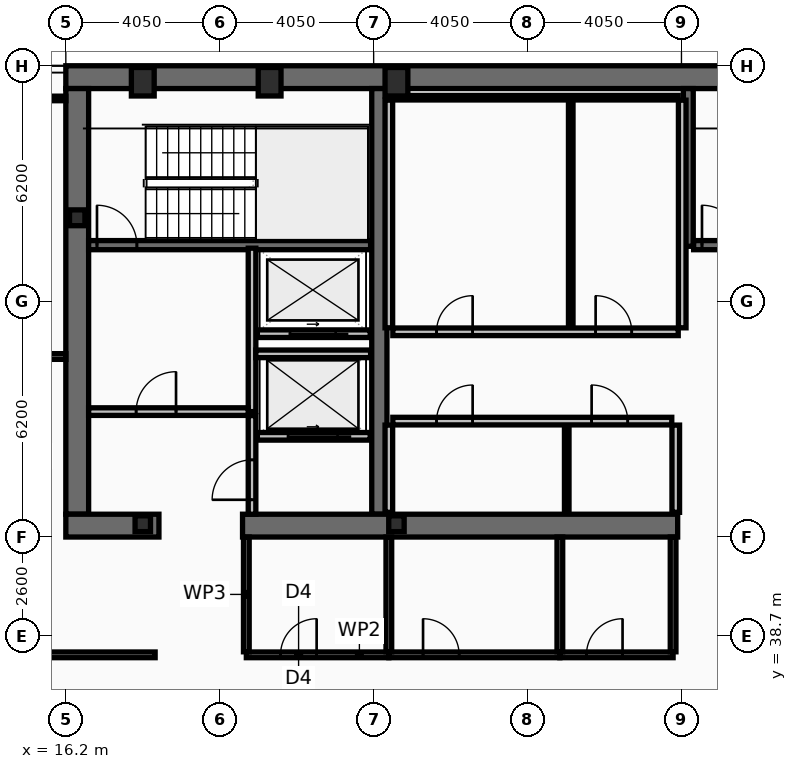
"""IFC4 building model, lengths in metres.
Left out: names, types, materials, properties, quantities, classifications, styles, units other than length and angle.
Written with IfcOpenShell. Run it as: python <this file> out.ifc"""

import sys

from ifc_helpers import new_model, si_unit, direction, frame, frame_2d, origin, origin_2d, place, context, subcontext, project, spatial, rectangle, hollow_rectangle, i_section, extrude, element, fill, save


model = new_model("IFC4")
c1 = context("Model", 3, precision=1e-05, world=origin(), true_north=direction((0.0, 1.0)))
c2 = subcontext(c1, "Body", "Model", "MODEL_VIEW")
j1 = project(units=[si_unit("LENGTHUNIT", "METRE"), si_unit("PLANEANGLEUNIT", "RADIAN")], contexts=[c1])
p1 = place(None, origin())
s1 = spatial("IfcSite", under=j1, at=p1, CompositionType="ELEMENT")
p2 = place(p1, origin())
s2 = spatial("IfcBuilding", under=s1, at=p2, CompositionType="ELEMENT")
p3 = place(p2, frame((0.0, 0.0, 261.8)))
s3 = spatial("IfcBuildingStorey", under=s2, at=p3, CompositionType="ELEMENT", Elevation=261.8)
p4 = place(p3, frame((16.2, 53.4, 0.0), z_axis=(0.0, 0.0, 1.0), x_axis=(1.0, 0.0, 0.0)))
e1 = element("IfcWall", 1, at=p4, inside=s3, PredefinedType="SHEAR", context=c2, shape_type="SweptSolid", body=[
    extrude(rectangle(XDim=40.5, YDim=0.6, at=frame_2d((20.25, 0.0))), origin(), (0.0, 0.0, 1.0), 3.4),
])
p5 = place(p3, frame((16.5, 41.9, 0.0), z_axis=(0.0, 0.0, 1.0), x_axis=(0.0, 1.0, 0.0)))
e2 = element("IfcWall", 2, at=p5, inside=s3, PredefinedType="SHEAR", context=c2, shape_type="SweptSolid", body=[
    extrude(rectangle(XDim=11.2, YDim=0.6, at=frame_2d((5.6, 0.0))), origin(), (0.0, 0.0, 1.0), 3.4),
])
p6 = place(p3, frame((24.45, 41.9, 0.0), z_axis=(0.0, 0.0, 1.0), x_axis=(0.0, 1.0, 0.0)))
e3 = element("IfcWall", 3, at=p6, inside=s3, PredefinedType="SHEAR", context=c2, shape_type="SweptSolid", body=[
    extrude(rectangle(XDim=11.2, YDim=0.4, at=frame_2d((5.6, 0.0))), origin(), (0.0, 0.0, 1.0), 3.4),
])
p7 = place(p3, frame((18.65, 41.6, 0.0), z_axis=(0.0, 0.0, 1.0), x_axis=(-1.0, 0.0, 0.0)))
e4 = element("IfcWall", 4, at=p7, inside=s3, PredefinedType="SHEAR", context=c2, shape_type="SweptSolid", body=[
    extrude(rectangle(XDim=2.45, YDim=0.6, at=frame_2d((1.225, 0.0))), origin(), (0.0, 0.0, 1.0), 3.4),
])
p8 = place(p3, frame((32.3, 41.6, 0.0), z_axis=(0.0, 0.0, 1.0), x_axis=(-1.0, 0.0, 0.0)))
e5 = element("IfcWall", 5, at=p8, inside=s3, PredefinedType="SHEAR", context=c2, shape_type="SweptSolid", body=[
    extrude(rectangle(XDim=11.45, YDim=0.6, at=frame_2d((5.725, 0.0))), origin(), (0.0, 0.0, 1.0), 3.4),
])
p9 = place(p3, frame((32.58, 48.95, 0.0), z_axis=(0.0, 0.0, 1.0), x_axis=(0.0, 1.0, 0.0)))
e6 = element("IfcWall", 6, at=p9, inside=s3, PredefinedType="SHEAR", context=c2, shape_type="SweptSolid", body=[
    extrude(rectangle(XDim=4.15, YDim=0.26, at=frame_2d((2.075, 0.0))), origin(), (0.0, 0.0, 1.0), 3.4),
])
p10 = place(p3, frame((16.8, 48.98, 0.0), z_axis=(0.0, 0.0, 1.0), x_axis=(1.0, 0.0, 0.0)))
e7 = element("IfcWall", 7, at=p10, inside=s3, PredefinedType="SHEAR", context=c2, shape_type="SweptSolid", body=[
    extrude(rectangle(XDim=7.42, YDim=0.24, at=frame_2d((3.71, 0.0))), origin(), (0.0, 0.0, 1.0), 3.4),
])
p11 = place(p10, frame((0.22, 0.0, 0.0)))
e8 = element("IfcOpeningElement", 8, at=p11, cuts=e7, PredefinedType="OPENING", context=c2, shape_type="SweptSolid", body=[
    extrude(rectangle(XDim=1.05, YDim=2.15, at=frame_2d((0.525, 1.075))), frame((0.0, 0.13, 0.0), z_axis=(0.0, -1.0, 0.0), x_axis=(1.0, 0.0, 0.0)), (0.0, 0.0, 1.0), 0.26),
])
p12 = place(p3, frame((32.72, 48.98, 0.0), z_axis=(0.0, 0.0, 1.0), x_axis=(1.0, 0.0, 0.0)))
e9 = element("IfcWall", 9, at=p12, inside=s3, PredefinedType="SHEAR", context=c2, shape_type="SweptSolid", body=[
    extrude(rectangle(XDim=7.56, YDim=0.24, at=frame_2d((3.78, 0.0))), origin(), (0.0, 0.0, 1.0), 3.4),
])
p13 = place(p12, frame((0.22, 0.0, 0.0)))
e10 = element("IfcOpeningElement", 10, at=p13, cuts=e9, PredefinedType="OPENING", context=c2, shape_type="SweptSolid", body=[
    extrude(rectangle(XDim=1.05, YDim=2.15, at=frame_2d((0.525, 1.075))), frame((0.0, 0.13, 0.0), z_axis=(0.0, -1.0, 0.0), x_axis=(1.0, 0.0, 0.0)), (0.0, 0.0, 1.0), 0.26),
])
for number, where, z_axis, x_axis in (
    (11, (18.225, 53.28, 0.0), (0.0, 0.0, 1.0), (1.0, 0.0, 0.0)),
    (12, (21.562, 53.28, 0.0), (0.0, 0.0, 1.0), (1.0, 0.0, 0.0)),
    (13, (24.9, 53.28, 0.0), (0.0, 0.0, 1.0), (1.0, 0.0, 0.0)),
):
    element("IfcColumn", number, at=place(p3, frame(where, z_axis=z_axis, x_axis=x_axis)), inside=s3, PredefinedType="COLUMN", context=c2, shape_type="SweptSolid", body=[
        extrude(hollow_rectangle(XDim=0.6, YDim=0.75, WallThickness=0.045, at=origin_2d()), origin(), (0.0, 0.0, 1.0), 3.6),
    ])
for number, where, z_axis, x_axis in (
    (14, (16.5, 49.7, 0.0), (0.0, 0.0, 1.0), (1.0, 0.0, 0.0)),
    (15, (18.225, 41.65, 0.0), (0.0, 0.0, 1.0), (1.0, 0.0, 0.0)),
    (16, (24.9, 41.65, 0.0), (0.0, 0.0, 1.0), (1.0, 0.0, 0.0)),
):
    element("IfcColumn", number, at=place(p3, frame(where, z_axis=z_axis, x_axis=x_axis)), inside=s3, PredefinedType="COLUMN", context=c2, shape_type="SweptSolid", body=[
        extrude(i_section(OverallWidth=0.406, OverallDepth=0.416, WebThickness=0.03, FlangeThickness=0.048, at=origin_2d()), origin(), (0.0, 0.0, 1.0), 3.6),
    ])
p14 = place(p3, frame((24.21, 43.95, 0.0), z_axis=(0.0, 0.0, 1.0), x_axis=(-1.0, 0.0, 0.0)))
e17 = element("IfcWall", 17, at=p14, inside=s3, PredefinedType="PARTITIONING", context=c2, shape_type="SweptSolid", body=[
    extrude(rectangle(XDim=2.97, YDim=0.2, at=frame_2d((1.485, 0.0))), origin(), (0.0, 0.0, 1.0), 3.4),
])
p15 = place(p14, frame((0.86, 0.0, 0.0)))
e18 = element("IfcOpeningElement", 18, at=p15, cuts=e17, PredefinedType="OPENING", context=c2, shape_type="SweptSolid", body=[
    extrude(rectangle(XDim=1.3, YDim=2.18, at=frame_2d((0.65, 1.09))), frame((0.0, 0.11, 0.0), z_axis=(0.0, -1.0, 0.0), x_axis=(1.0, 0.0, 0.0)), (0.0, 0.0, 1.0), 0.22),
])
p16 = place(p3, frame((24.21, 46.65, 0.0), z_axis=(0.0, 0.0, 1.0), x_axis=(-1.0, 0.0, 0.0)))
e19 = element("IfcWall", 19, at=p16, inside=s3, PredefinedType="PARTITIONING", context=c2, shape_type="SweptSolid", body=[
    extrude(rectangle(XDim=2.97, YDim=0.2, at=frame_2d((1.485, 0.0))), origin(), (0.0, 0.0, 1.0), 3.4),
])
p17 = place(p16, frame((0.91, 0.0, 0.0)))
e20 = element("IfcOpeningElement", 20, at=p17, cuts=e19, PredefinedType="OPENING", context=c2, shape_type="SweptSolid", body=[
    extrude(rectangle(XDim=1.2, YDim=2.18, at=frame_2d((0.6, 1.09))), frame((0.0, 0.11, 0.0), z_axis=(0.0, -1.0, 0.0), x_axis=(1.0, 0.0, 0.0)), (0.0, 0.0, 1.0), 0.22),
])
p18 = place(p3, frame((21.1, 44.6, 0.0), z_axis=(0.0, 0.0, 1.0), x_axis=(0.0, 1.0, 0.0)))
e21 = element("IfcWall", 21, at=p18, inside=s3, PredefinedType="PARTITIONING", context=c2, shape_type="SweptSolid", body=[
    extrude(rectangle(XDim=4.3, YDim=0.2, at=frame_2d((2.15, 0.0))), origin(), (0.0, 0.0, 1.0), 3.4),
])
p19 = place(p3, frame((16.8, 44.6, 0.0), z_axis=(0.0, 0.0, 1.0), x_axis=(1.0, 0.0, 0.0)))
e22 = element("IfcWall", 22, at=p19, inside=s3, PredefinedType="PARTITIONING", context=c2, shape_type="SweptSolid", body=[
    extrude(rectangle(XDim=4.2, YDim=0.2, at=frame_2d((2.1, 0.0))), origin(), (0.0, 0.0, 1.0), 3.4),
])
p20 = place(p19, frame((1.25, 0.0, 0.0)))
e23 = element("IfcOpeningElement", 23, at=p20, cuts=e22, PredefinedType="OPENING", context=c2, shape_type="SweptSolid", body=[
    extrude(rectangle(XDim=1.05, YDim=2.15, at=frame_2d((0.525, 1.075))), frame((0.0, 0.11, 0.0), z_axis=(0.0, -1.0, 0.0), x_axis=(1.0, 0.0, 0.0)), (0.0, 0.0, 1.0), 0.22),
])
p21 = place(p3, frame((21.2, 46.12, 0.0), z_axis=(0.0, 0.0, 1.0), x_axis=(1.0, 0.0, 0.0)))
e24 = element("IfcWall", 24, at=p21, inside=s3, PredefinedType="PARTITIONING", context=c2, shape_type="SweptSolid", body=[
    extrude(rectangle(XDim=3.02, YDim=0.2, at=frame_2d((1.51, 0.0))), origin(), (0.0, 0.0, 1.0), 3.4),
])
p22 = place(p3, frame((21.1, 41.9, 0.0), z_axis=(0.0, 0.0, 1.0), x_axis=(0.0, 1.0, 0.0)))
e25 = element("IfcWall", 25, at=p22, inside=s3, PredefinedType="PARTITIONING", context=c2, shape_type="SweptSolid", body=[
    extrude(rectangle(XDim=2.595, YDim=0.2, at=frame_2d((1.298, 0.0))), origin(), (0.0, 0.0, 1.0), 3.4),
])
p23 = place(p22, frame((0.38, 0.0, 0.0)))
e26 = element("IfcOpeningElement", 26, at=p23, cuts=e25, PredefinedType="OPENING", context=c2, shape_type="SweptSolid", body=[
    extrude(rectangle(XDim=1.05, YDim=2.15, at=frame_2d((0.525, 1.075))), frame((0.0, 0.11, 0.0), z_axis=(0.0, -1.0, 0.0), x_axis=(1.0, 0.0, 0.0)), (0.0, 0.0, 1.0), 0.22),
])
for number, where, z_axis, x_axis in (
    (27, (24.7, 46.805, 0.0), (0.0, 0.0, 1.0), (0.0, 1.0, 0.0)),
    (28, (32.42, 46.805, 0.0), (0.0, 0.0, 1.0), (0.0, 1.0, 0.0)),
):
    element("IfcWall", number, at=place(p3, frame(where, z_axis=z_axis, x_axis=x_axis)), inside=s3, PredefinedType="PARTITIONING", context=c2, shape_type="SweptSolid", body=[
        extrude(rectangle(XDim=5.99, YDim=0.2, at=frame_2d((2.995, 0.0))), origin(), (0.0, 0.0, 1.0), 3.4),
    ])
p24 = place(p3, frame((24.805, 52.86, 0.0), z_axis=(0.0, 0.0, 1.0), x_axis=(1.0, 0.0, 0.0)))
e29 = element("IfcWall", 29, at=p24, inside=s3, PredefinedType="PARTITIONING", context=c2, shape_type="SweptSolid", body=[
    extrude(rectangle(XDim=7.51, YDim=0.12, at=frame_2d((3.755, 0.0))), origin(), (0.0, 0.0, 1.0), 3.4),
])
p25 = place(p3, frame((29.486, 46.805, 0.0), z_axis=(0.0, 0.0, 1.0), x_axis=(0.0, 1.0, 0.0)))
e30 = element("IfcWall", 30, at=p25, inside=s3, PredefinedType="PARTITIONING", context=c2, shape_type="SweptSolid", body=[
    extrude(rectangle(XDim=5.99, YDim=0.12, at=frame_2d((2.995, 0.0))), origin(), (0.0, 0.0, 1.0), 3.4),
])
p26 = place(p3, frame((24.805, 46.7, 0.0), z_axis=(0.0, 0.0, 1.0), x_axis=(1.0, 0.0, 0.0)))
e31 = element("IfcWall", 31, at=p26, inside=s3, PredefinedType="PARTITIONING", context=c2, shape_type="SweptSolid", body=[
    extrude(rectangle(XDim=7.51, YDim=0.2, at=frame_2d((3.755, 0.0))), origin(), (0.0, 0.0, 1.0), 3.4),
])
p27 = place(p26, frame((1.15, 0.0, 0.0)))
e32 = element("IfcOpeningElement", 32, at=p27, cuts=e31, PredefinedType="OPENING", context=c2, shape_type="SweptSolid", body=[
    extrude(rectangle(XDim=0.95, YDim=2.1, at=frame_2d((0.475, 1.05))), frame((0.0, 0.11, 0.0), z_axis=(0.0, -1.0, 0.0), x_axis=(1.0, 0.0, 0.0)), (0.0, 0.0, 1.0), 0.22),
])
p28 = place(p26, frame((5.336, 0.0, 0.0)))
e33 = element("IfcOpeningElement", 33, at=p28, cuts=e31, PredefinedType="OPENING", context=c2, shape_type="SweptSolid", body=[
    extrude(rectangle(XDim=0.95, YDim=2.1, at=frame_2d((0.475, 1.05))), frame((0.0, 0.11, 0.0), z_axis=(0.0, -1.0, 0.0), x_axis=(1.0, 0.0, 0.0)), (0.0, 0.0, 1.0), 0.22),
])
for number, where, z_axis, x_axis in (
    (34, (24.7, 41.95, 0.0), (0.0, 0.0, 1.0), (0.0, 1.0, 0.0)),
    (35, (32.25, 41.95, 0.0), (0.0, 0.0, 1.0), (0.0, 1.0, 0.0)),
):
    element("IfcWall", number, at=place(p3, frame(where, z_axis=z_axis, x_axis=x_axis)), inside=s3, PredefinedType="PARTITIONING", context=c2, shape_type="SweptSolid", body=[
        extrude(rectangle(XDim=2.295, YDim=0.2, at=frame_2d((1.147, 0.0))), origin(), (0.0, 0.0, 1.0), 3.4),
    ])
p29 = place(p3, frame((29.381, 41.95, 0.0), z_axis=(0.0, 0.0, 1.0), x_axis=(0.0, 1.0, 0.0)))
e36 = element("IfcWall", 36, at=p29, inside=s3, PredefinedType="PARTITIONING", context=c2, shape_type="SweptSolid", body=[
    extrude(rectangle(XDim=2.295, YDim=0.12, at=frame_2d((1.147, 0.0))), origin(), (0.0, 0.0, 1.0), 3.4),
])
p30 = place(p3, frame((24.805, 44.35, 0.0), z_axis=(0.0, 0.0, 1.0), x_axis=(1.0, 0.0, 0.0)))
e37 = element("IfcWall", 37, at=p30, inside=s3, PredefinedType="PARTITIONING", context=c2, shape_type="SweptSolid", body=[
    extrude(rectangle(XDim=7.34, YDim=0.2, at=frame_2d((3.67, 0.0))), origin(), (0.0, 0.0, 1.0), 3.4),
])
p31 = place(p30, frame((1.15, 0.0, 0.0)))
e38 = element("IfcOpeningElement", 38, at=p31, cuts=e37, PredefinedType="OPENING", context=c2, shape_type="SweptSolid", body=[
    extrude(rectangle(XDim=0.95, YDim=2.1, at=frame_2d((0.475, 1.05))), frame((0.0, 0.11, 0.0), z_axis=(0.0, -1.0, 0.0), x_axis=(1.0, 0.0, 0.0)), (0.0, 0.0, 1.0), 0.22),
])
p32 = place(p30, frame((5.231, 0.0, 0.0)))
e39 = element("IfcOpeningElement", 39, at=p32, cuts=e37, PredefinedType="OPENING", context=c2, shape_type="SweptSolid", body=[
    extrude(rectangle(XDim=0.95, YDim=2.1, at=frame_2d((0.475, 1.05))), frame((0.0, 0.11, 0.0), z_axis=(0.0, -1.0, 0.0), x_axis=(1.0, 0.0, 0.0)), (0.0, 0.0, 1.0), 0.22),
])
p33 = place(p3, frame((20.95, 38.2, 0.0), z_axis=(0.0, 0.0, 1.0), x_axis=(1.0, 0.0, 0.0)))
e40 = element("IfcWall", 40, at=p33, inside=s3, PredefinedType="PARTITIONING", context=c2, shape_type="SweptSolid", body=[
    extrude(rectangle(XDim=3.75, YDim=0.15, at=frame_2d((1.875, 0.0))), origin(), (0.0, 0.0, 1.0), 2.74),
])
p34 = place(p33, frame((0.9, 0.0, 0.0)))
e41 = element("IfcOpeningElement", 41, at=p34, cuts=e40, PredefinedType="OPENING", context=c2, shape_type="SweptSolid", body=[
    extrude(rectangle(XDim=0.95, YDim=2.05, at=frame_2d((0.475, 1.025))), frame((0.0, 0.085, 0.0), z_axis=(0.0, -1.0, 0.0), x_axis=(1.0, 0.0, 0.0)), (0.0, 0.0, 1.0), 0.17),
])
p35 = place(p3, frame((24.7, 38.2, 0.0), z_axis=(0.0, 0.0, 1.0), x_axis=(1.0, 0.0, 0.0)))
e42 = element("IfcWall", 42, at=p35, inside=s3, PredefinedType="PARTITIONING", context=c2, shape_type="SweptSolid", body=[
    extrude(rectangle(XDim=4.5, YDim=0.15, at=frame_2d((2.25, 0.0))), origin(), (0.0, 0.0, 1.0), 2.74),
])
p36 = place(p35, frame((0.9, 0.0, 0.0)))
e43 = element("IfcOpeningElement", 43, at=p36, cuts=e42, PredefinedType="OPENING", context=c2, shape_type="SweptSolid", body=[
    extrude(rectangle(XDim=0.95, YDim=2.05, at=frame_2d((0.475, 1.025))), frame((0.0, 0.085, 0.0), z_axis=(0.0, -1.0, 0.0), x_axis=(1.0, 0.0, 0.0)), (0.0, 0.0, 1.0), 0.17),
])
p37 = place(p3, frame((29.2, 38.2, 0.0), z_axis=(0.0, 0.0, 1.0), x_axis=(1.0, 0.0, 0.0)))
e44 = element("IfcWall", 44, at=p37, inside=s3, PredefinedType="PARTITIONING", context=c2, shape_type="SweptSolid", body=[
    extrude(rectangle(XDim=2.98, YDim=0.15, at=frame_2d((1.49, 0.0))), origin(), (0.0, 0.0, 1.0), 2.74),
])
p38 = place(p37, frame((0.7, 0.0, 0.0)))
e45 = element("IfcOpeningElement", 45, at=p38, cuts=e44, PredefinedType="OPENING", context=c2, shape_type="SweptSolid", body=[
    extrude(rectangle(XDim=0.95, YDim=2.05, at=frame_2d((0.475, 1.025))), frame((0.0, 0.085, 0.0), z_axis=(0.0, -1.0, 0.0), x_axis=(1.0, 0.0, 0.0)), (0.0, 0.0, 1.0), 0.17),
])
p39 = place(p3, frame((20.95, 38.28, 0.0), z_axis=(0.0, 0.0, 1.0), x_axis=(0.0, 1.0, 0.0)))
e46 = element("IfcWall", 46, at=p39, inside=s3, PredefinedType="PARTITIONING", context=c2, shape_type="SweptSolid", body=[
    extrude(rectangle(XDim=3.02, YDim=0.15, at=frame_2d((1.51, 0.0))), origin(), (0.0, 0.0, 1.0), 3.4),
])
p40 = place(p3, frame((24.7, 38.28, 0.0), z_axis=(0.0, 0.0, 1.0), x_axis=(0.0, 1.0, 0.0)))
e47 = element("IfcWall", 47, at=p40, inside=s3, PredefinedType="PARTITIONING", context=c2, shape_type="SweptSolid", body=[
    extrude(rectangle(XDim=3.02, YDim=0.15, at=frame_2d((1.51, 0.0))), origin(), (0.0, 0.0, 1.0), 2.74),
])
for number, where, z_axis, x_axis in (
    (48, (29.2, 38.28, 0.0), (0.0, 0.0, 1.0), (0.0, 1.0, 0.0)),
    (49, (32.18, 38.28, 0.0), (0.0, 0.0, 1.0), (0.0, 1.0, 0.0)),
):
    element("IfcWall", number, at=place(p3, frame(where, z_axis=z_axis, x_axis=x_axis)), inside=s3, PredefinedType="PARTITIONING", context=c2, shape_type="SweptSolid", body=[
        extrude(rectangle(XDim=3.02, YDim=0.15, at=frame_2d((1.51, 0.0))), origin(), (0.0, 0.0, 1.0), 3.4),
    ])
p41 = place(p3, frame((10.03, 38.2, 0.0), z_axis=(0.0, 0.0, 1.0), x_axis=(1.0, 0.0, 0.0)))
e50 = element("IfcWall", 50, at=p41, inside=s3, PredefinedType="PARTITIONING", context=c2, shape_type="SweptSolid", body=[
    extrude(rectangle(XDim=8.52, YDim=0.15, at=frame_2d((4.26, 0.0))), origin(), (0.0, 0.0, 1.0), 2.74),
])
p42 = place(p41, frame((4.32, 0.0, 0.0)))
e51 = element("IfcOpeningElement", 51, at=p42, cuts=e50, PredefinedType="OPENING", context=c2, shape_type="SweptSolid", body=[
    extrude(rectangle(XDim=0.95, YDim=2.05, at=frame_2d((0.475, 1.025))), frame((0.0, 0.085, 0.0), z_axis=(0.0, -1.0, 0.0), x_axis=(1.0, 0.0, 0.0)), (0.0, 0.0, 1.0), 0.17),
])
p43 = place(p3, frame((10.095, 46.05, 0.0), z_axis=(0.0, 0.0, 1.0), x_axis=(1.0, 0.0, 0.0)))
e52 = element("IfcWall", 52, at=p43, inside=s3, PredefinedType="PARTITIONING", context=c2, shape_type="SweptSolid", body=[
    extrude(rectangle(XDim=6.105, YDim=0.15, at=frame_2d((3.052, 0.0))), origin(), (0.0, 0.0, 1.0), 2.79),
])
p44 = place(p43, frame((4.32, 0.0, 0.0)))
e53 = element("IfcOpeningElement", 53, at=p44, cuts=e52, PredefinedType="OPENING", context=c2, shape_type="SweptSolid", body=[
    extrude(rectangle(XDim=0.9, YDim=2.05, at=frame_2d((0.45, 1.025))), frame((0.0, 0.085, 0.0), z_axis=(0.0, -1.0, 0.0), x_axis=(1.0, 0.0, 0.0)), (0.0, 0.0, 1.0), 0.17),
])
p45 = place(p3, frame((10.095, 52.84, 0.0), z_axis=(0.0, 0.0, 1.0), x_axis=(1.0, 0.0, 0.0)))
e54 = element("IfcWall", 54, at=p45, inside=s3, PredefinedType="PARTITIONING", context=c2, shape_type="SweptSolid", body=[
    extrude(rectangle(XDim=6.105, YDim=0.12, at=frame_2d((3.052, 0.0))), origin(), (0.0, 0.0, 1.0), 3.4),
])
p46 = place(p11, origin())
e55 = element("IfcDoor", 55, at=p46, inside=s3, OperationType="SINGLE_SWING_LEFT", PredefinedType="DOOR", context=c2, shape_type="SweptSolid", body=[
    extrude(rectangle(XDim=1.05, YDim=2.15, at=frame_2d((0.525, 1.075))), frame((0.0, 0.025, 0.0), z_axis=(0.0, -1.0, 0.0), x_axis=(1.0, 0.0, 0.0)), (0.0, 0.0, 1.0), 0.05),
])
fill(e8, e55)
p47 = place(p13, origin())
e56 = element("IfcDoor", 56, at=p47, inside=s3, OperationType="SINGLE_SWING_LEFT", PredefinedType="DOOR", context=c2, shape_type="SweptSolid", body=[
    extrude(rectangle(XDim=1.05, YDim=2.15, at=frame_2d((0.525, 1.075))), frame((0.0, 0.025, 0.0), z_axis=(0.0, -1.0, 0.0), x_axis=(1.0, 0.0, 0.0)), (0.0, 0.0, 1.0), 0.05),
])
fill(e10, e56)
p48 = place(p15, origin())
e57 = element("IfcDoor", 57, at=p48, inside=s3, OperationType="SLIDING_TO_LEFT", PredefinedType="DOOR", context=c2, shape_type="SweptSolid", body=[
    extrude(rectangle(XDim=1.3, YDim=2.18, at=frame_2d((0.65, 1.09))), frame((0.0, 0.025, 0.0), z_axis=(0.0, -1.0, 0.0), x_axis=(1.0, 0.0, 0.0)), (0.0, 0.0, 1.0), 0.05),
])
fill(e18, e57)
p49 = place(p17, origin())
e58 = element("IfcDoor", 58, at=p49, inside=s3, OperationType="SLIDING_TO_LEFT", PredefinedType="DOOR", context=c2, shape_type="SweptSolid", body=[
    extrude(rectangle(XDim=1.2, YDim=2.18, at=frame_2d((0.6, 1.09))), frame((0.0, 0.025, 0.0), z_axis=(0.0, -1.0, 0.0), x_axis=(1.0, 0.0, 0.0)), (0.0, 0.0, 1.0), 0.05),
])
fill(e20, e58)
p50 = place(p20, origin())
e59 = element("IfcDoor", 59, at=p50, inside=s3, OperationType="SINGLE_SWING_RIGHT", PredefinedType="DOOR", context=c2, shape_type="SweptSolid", body=[
    extrude(rectangle(XDim=1.05, YDim=2.15, at=frame_2d((0.525, 1.075))), frame((0.0, 0.025, 0.0), z_axis=(0.0, -1.0, 0.0), x_axis=(1.0, 0.0, 0.0)), (0.0, 0.0, 1.0), 0.05),
])
fill(e23, e59)
p51 = place(p23, origin())
e60 = element("IfcDoor", 60, at=p51, inside=s3, OperationType="SINGLE_SWING_LEFT", PredefinedType="DOOR", context=c2, shape_type="SweptSolid", body=[
    extrude(rectangle(XDim=1.05, YDim=2.15, at=frame_2d((0.525, 1.075))), frame((0.0, 0.025, 0.0), z_axis=(0.0, -1.0, 0.0), x_axis=(1.0, 0.0, 0.0)), (0.0, 0.0, 1.0), 0.05),
])
fill(e26, e60)
p52 = place(p27, origin())
e61 = element("IfcDoor", 61, at=p52, inside=s3, OperationType="SINGLE_SWING_RIGHT", PredefinedType="DOOR", context=c2, shape_type="SweptSolid", body=[
    extrude(rectangle(XDim=0.95, YDim=2.1, at=frame_2d((0.475, 1.05))), frame((0.0, 0.025, 0.0), z_axis=(0.0, -1.0, 0.0), x_axis=(1.0, 0.0, 0.0)), (0.0, 0.0, 1.0), 0.05),
])
fill(e32, e61)
p53 = place(p28, origin())
e62 = element("IfcDoor", 62, at=p53, inside=s3, OperationType="SINGLE_SWING_LEFT", PredefinedType="DOOR", context=c2, shape_type="SweptSolid", body=[
    extrude(rectangle(XDim=0.95, YDim=2.1, at=frame_2d((0.475, 1.05))), frame((0.0, 0.025, 0.0), z_axis=(0.0, -1.0, 0.0), x_axis=(1.0, 0.0, 0.0)), (0.0, 0.0, 1.0), 0.05),
])
fill(e33, e62)
p54 = place(p31, origin())
e63 = element("IfcDoor", 63, at=p54, inside=s3, OperationType="SINGLE_SWING_RIGHT", PredefinedType="DOOR", context=c2, shape_type="SweptSolid", body=[
    extrude(rectangle(XDim=0.95, YDim=2.1, at=frame_2d((0.475, 1.05))), frame((0.0, 0.025, 0.0), z_axis=(0.0, -1.0, 0.0), x_axis=(1.0, 0.0, 0.0)), (0.0, 0.0, 1.0), 0.05),
])
fill(e38, e63)
p55 = place(p32, origin())
e64 = element("IfcDoor", 64, at=p55, inside=s3, OperationType="SINGLE_SWING_LEFT", PredefinedType="DOOR", context=c2, shape_type="SweptSolid", body=[
    extrude(rectangle(XDim=0.95, YDim=2.1, at=frame_2d((0.475, 1.05))), frame((0.0, 0.025, 0.0), z_axis=(0.0, -1.0, 0.0), x_axis=(1.0, 0.0, 0.0)), (0.0, 0.0, 1.0), 0.05),
])
fill(e39, e64)
p56 = place(p34, origin())
e65 = element("IfcDoor", 65, at=p56, inside=s3, OperationType="SINGLE_SWING_RIGHT", PredefinedType="DOOR", context=c2, shape_type="SweptSolid", body=[
    extrude(rectangle(XDim=0.95, YDim=2.05, at=frame_2d((0.475, 1.025))), frame((0.0, 0.025, 0.0), z_axis=(0.0, -1.0, 0.0), x_axis=(1.0, 0.0, 0.0)), (0.0, 0.0, 1.0), 0.05),
])
fill(e41, e65)
p57 = place(p36, origin())
e66 = element("IfcDoor", 66, at=p57, inside=s3, OperationType="SINGLE_SWING_LEFT", PredefinedType="DOOR", context=c2, shape_type="SweptSolid", body=[
    extrude(rectangle(XDim=0.95, YDim=2.05, at=frame_2d((0.475, 1.025))), frame((0.0, 0.025, 0.0), z_axis=(0.0, -1.0, 0.0), x_axis=(1.0, 0.0, 0.0)), (0.0, 0.0, 1.0), 0.05),
])
fill(e43, e66)
p58 = place(p38, origin())
e67 = element("IfcDoor", 67, at=p58, inside=s3, OperationType="SINGLE_SWING_RIGHT", PredefinedType="DOOR", context=c2, shape_type="SweptSolid", body=[
    extrude(rectangle(XDim=0.95, YDim=2.05, at=frame_2d((0.475, 1.025))), frame((0.0, 0.025, 0.0), z_axis=(0.0, -1.0, 0.0), x_axis=(1.0, 0.0, 0.0)), (0.0, 0.0, 1.0), 0.05),
])
fill(e45, e67)
save(model, sys.argv[1])
